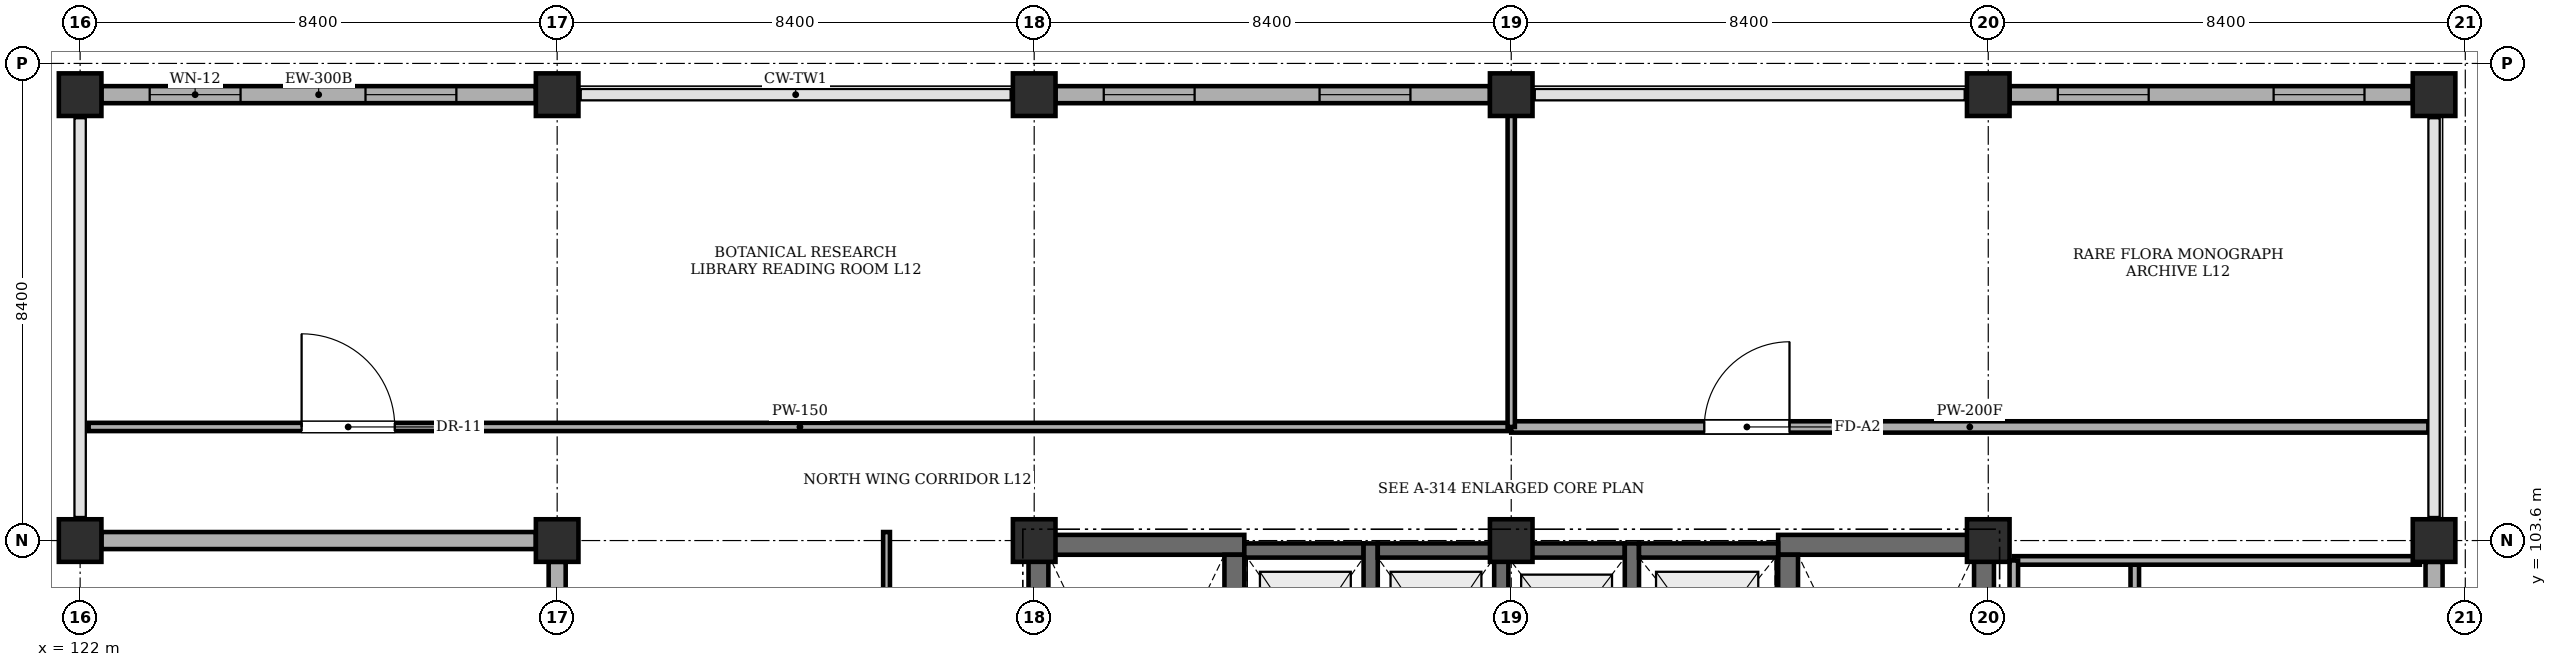
"""IFC4 building model, lengths in metres.
Left out: names, types, materials, properties, quantities, classifications, styles, units other than length and angle.
Written with IfcOpenShell. Run it as: python <this file> out.ifc"""

import sys

from ifc_helpers import new_model, si_unit, direction, frame, frame_2d, origin, origin_2d, place, context, subcontext, project, spatial, rectangle, extrude, element, fill, save


model = new_model("IFC4")
c1 = context("Model", 3, precision=1e-05, world=origin(), true_north=direction((0.0, 1.0)))
c2 = subcontext(c1, "Body", "Model", "MODEL_VIEW")
j1 = project(units=[si_unit("LENGTHUNIT", "METRE"), si_unit("PLANEANGLEUNIT", "RADIAN")], contexts=[c1])
p1 = place(None, origin())
s1 = spatial("IfcSite", under=j1, at=p1, CompositionType="ELEMENT")
p2 = place(p1, origin())
s2 = spatial("IfcBuilding", under=s1, at=p2, CompositionType="ELEMENT")
p3 = place(p2, frame((0.0, 0.0, 48.6)))
s3 = spatial("IfcBuildingStorey", under=s2, at=p3, CompositionType="ELEMENT", Elevation=48.6)
for number, where, z_axis, x_axis in (
    (1, (122.0, 103.6, 0.0), (0.0, 0.0, 1.0), (1.0, 0.0, 0.0)),
    (2, (122.0, 111.45, 0.0), (0.0, 0.0, 1.0), (1.0, 0.0, 0.0)),
    (3, (130.4, 103.6, 0.0), (0.0, 0.0, 1.0), (1.0, 0.0, 0.0)),
    (4, (130.4, 111.45, 0.0), (0.0, 0.0, 1.0), (1.0, 0.0, 0.0)),
    (5, (138.8, 103.6, 0.0), (0.0, 0.0, 1.0), (1.0, 0.0, 0.0)),
    (6, (138.8, 111.45, 0.0), (0.0, 0.0, 1.0), (1.0, 0.0, 0.0)),
    (7, (147.2, 103.6, 0.0), (0.0, 0.0, 1.0), (1.0, 0.0, 0.0)),
    (8, (147.2, 111.45, 0.0), (0.0, 0.0, 1.0), (1.0, 0.0, 0.0)),
    (9, (155.6, 103.6, 0.0), (0.0, 0.0, 1.0), (1.0, 0.0, 0.0)),
    (10, (155.6, 111.45, 0.0), (0.0, 0.0, 1.0), (1.0, 0.0, 0.0)),
    (11, (163.45, 103.6, 0.0), (0.0, 0.0, 1.0), (1.0, 0.0, 0.0)),
    (12, (163.45, 111.45, 0.0), (0.0, 0.0, 1.0), (1.0, 0.0, 0.0)),
):
    element("IfcColumn", number, at=place(p3, frame(where, z_axis=z_axis, x_axis=x_axis)), inside=s3, PredefinedType="COLUMN", context=c2, shape_type="SweptSolid", body=[
        extrude(rectangle(XDim=0.75, YDim=0.75, at=origin_2d()), origin(), (0.0, 0.0, 1.0), 4.03),
    ])
p4 = place(p3, frame((138.7, 103.525, 0.0), z_axis=(0.0, 0.0, 1.0), x_axis=(1.0, 0.0, 0.0)))
e13 = element("IfcWall", 13, at=p4, inside=s3, PredefinedType="SHEAR", context=c2, shape_type="SweptSolid", body=[
    extrude(rectangle(XDim=3.8, YDim=0.35, at=frame_2d((1.9, 0.0))), origin(), (0.0, 0.0, 1.0), 4.03),
])
p5 = place(p3, frame((138.875, 95.45, 0.0), z_axis=(0.0, 0.0, 1.0), x_axis=(0.0, 1.0, 0.0)))
e14 = element("IfcWall", 14, at=p5, inside=s3, PredefinedType="SHEAR", context=c2, shape_type="SweptSolid", body=[
    extrude(rectangle(XDim=7.9, YDim=0.35, at=frame_2d((3.95, 0.0))), origin(), (0.0, 0.0, 1.0), 4.03),
])
p6 = place(p3, frame((142.325, 95.45, 0.0), z_axis=(0.0, 0.0, 1.0), x_axis=(0.0, 1.0, 0.0)))
e15 = element("IfcWall", 15, at=p6, inside=s3, PredefinedType="SHEAR", context=c2, shape_type="SweptSolid", body=[
    extrude(rectangle(XDim=7.9, YDim=0.35, at=frame_2d((3.95, 0.0))), origin(), (0.0, 0.0, 1.0), 4.03),
])
p7 = place(p6, frame((0.22, 0.0, 0.0)))
e16 = element("IfcOpeningElement", 16, at=p7, cuts=e15, PredefinedType="OPENING", context=c2, shape_type="SweptSolid", body=[
    extrude(rectangle(XDim=1.15, YDim=2.15, at=frame_2d((0.575, 1.075))), frame((0.0, 0.185, 0.0), z_axis=(0.0, -1.0, 0.0), x_axis=(1.0, 0.0, 0.0)), (0.0, 0.0, 1.0), 0.37),
])
p8 = place(p3, frame((151.9, 103.525, 0.0), z_axis=(0.0, 0.0, 1.0), x_axis=(1.0, 0.0, 0.0)))
e17 = element("IfcWall", 17, at=p8, inside=s3, PredefinedType="SHEAR", context=c2, shape_type="SweptSolid", body=[
    extrude(rectangle(XDim=3.8, YDim=0.35, at=frame_2d((1.9, 0.0))), origin(), (0.0, 0.0, 1.0), 4.03),
])
p9 = place(p3, frame((152.075, 95.45, 0.0), z_axis=(0.0, 0.0, 1.0), x_axis=(0.0, 1.0, 0.0)))
e18 = element("IfcWall", 18, at=p9, inside=s3, PredefinedType="SHEAR", context=c2, shape_type="SweptSolid", body=[
    extrude(rectangle(XDim=7.9, YDim=0.35, at=frame_2d((3.95, 0.0))), origin(), (0.0, 0.0, 1.0), 4.03),
])
p10 = place(p9, frame((0.35, 0.0, 0.0)))
e19 = element("IfcOpeningElement", 19, at=p10, cuts=e18, PredefinedType="OPENING", context=c2, shape_type="SweptSolid", body=[
    extrude(rectangle(XDim=1.15, YDim=2.15, at=frame_2d((0.575, 1.075))), frame((0.0, 0.185, 0.0), z_axis=(0.0, -1.0, 0.0), x_axis=(1.0, 0.0, 0.0)), (0.0, 0.0, 1.0), 0.37),
])
p11 = place(p3, frame((155.525, 95.45, 0.0), z_axis=(0.0, 0.0, 1.0), x_axis=(0.0, 1.0, 0.0)))
e20 = element("IfcWall", 20, at=p11, inside=s3, PredefinedType="SHEAR", context=c2, shape_type="SweptSolid", body=[
    extrude(rectangle(XDim=7.9, YDim=0.35, at=frame_2d((3.95, 0.0))), origin(), (0.0, 0.0, 1.0), 4.03),
])
p12 = place(p3, frame((142.5, 103.425, 0.0), z_axis=(0.0, 0.0, 1.0), x_axis=(1.0, 0.0, 0.0)))
e21 = element("IfcWall", 21, at=p12, inside=s3, PredefinedType="SHEAR", context=c2, shape_type="SweptSolid", body=[
    extrude(rectangle(XDim=2.1, YDim=0.25, at=frame_2d((1.05, 0.0))), origin(), (0.0, 0.0, 1.0), 4.03),
])
p13 = place(p3, frame((144.725, 100.15, 0.0), z_axis=(0.0, 0.0, 1.0), x_axis=(0.0, 1.0, 0.0)))
e22 = element("IfcWall", 22, at=p13, inside=s3, PredefinedType="SHEAR", context=c2, shape_type="SweptSolid", body=[
    extrude(rectangle(XDim=3.4, YDim=0.25, at=frame_2d((1.7, 0.0))), origin(), (0.0, 0.0, 1.0), 4.03),
])
p14 = place(p3, frame((144.85, 103.425, 0.0), z_axis=(0.0, 0.0, 1.0), x_axis=(1.0, 0.0, 0.0)))
e23 = element("IfcWall", 23, at=p14, inside=s3, PredefinedType="SHEAR", context=c2, shape_type="SweptSolid", body=[
    extrude(rectangle(XDim=2.05, YDim=0.25, at=frame_2d((1.025, 0.0))), origin(), (0.0, 0.0, 1.0), 4.03),
])
p15 = place(p3, frame((147.025, 100.15, 0.0), z_axis=(0.0, 0.0, 1.0), x_axis=(0.0, 1.0, 0.0)))
e24 = element("IfcWall", 24, at=p15, inside=s3, PredefinedType="SHEAR", context=c2, shape_type="SweptSolid", body=[
    extrude(rectangle(XDim=3.4, YDim=0.25, at=frame_2d((1.7, 0.0))), origin(), (0.0, 0.0, 1.0), 4.03),
])
p16 = place(p3, frame((147.15, 103.425, 0.0), z_axis=(0.0, 0.0, 1.0), x_axis=(1.0, 0.0, 0.0)))
e25 = element("IfcWall", 25, at=p16, inside=s3, PredefinedType="SHEAR", context=c2, shape_type="SweptSolid", body=[
    extrude(rectangle(XDim=2.05, YDim=0.25, at=frame_2d((1.025, 0.0))), origin(), (0.0, 0.0, 1.0), 4.03),
])
p17 = place(p3, frame((149.325, 100.35, 0.0), z_axis=(0.0, 0.0, 1.0), x_axis=(0.0, 1.0, 0.0)))
e26 = element("IfcWall", 26, at=p17, inside=s3, PredefinedType="SHEAR", context=c2, shape_type="SweptSolid", body=[
    extrude(rectangle(XDim=3.2, YDim=0.25, at=frame_2d((1.6, 0.0))), origin(), (0.0, 0.0, 1.0), 4.03),
])
p18 = place(p3, frame((149.45, 103.425, 0.0), z_axis=(0.0, 0.0, 1.0), x_axis=(1.0, 0.0, 0.0)))
e27 = element("IfcWall", 27, at=p18, inside=s3, PredefinedType="SHEAR", context=c2, shape_type="SweptSolid", body=[
    extrude(rectangle(XDim=2.45, YDim=0.25, at=frame_2d((1.225, 0.0))), origin(), (0.0, 0.0, 1.0), 4.03),
])
p19 = place(p3, frame((122.375, 111.45, 0.0), z_axis=(0.0, 0.0, 1.0), x_axis=(1.0, 0.0, 0.0)))
e28 = element("IfcWall", 28, at=p19, inside=s3, PredefinedType="STANDARD", context=c2, shape_type="SweptSolid", body=[
    extrude(rectangle(XDim=7.65, YDim=0.3, at=frame_2d((3.825, 0.0))), origin(), (0.0, 0.0, 1.0), 3.33),
])
p20 = place(p19, frame((0.85, 0.0, 0.9)))
e29 = element("IfcOpeningElement", 29, at=p20, cuts=e28, PredefinedType="OPENING", context=c2, shape_type="SweptSolid", body=[
    extrude(rectangle(XDim=1.6, YDim=2.0, at=frame_2d((0.8, 1.0))), frame((0.0, 0.16, 0.0), z_axis=(0.0, -1.0, 0.0), x_axis=(1.0, 0.0, 0.0)), (0.0, 0.0, 1.0), 0.32),
])
p21 = place(p19, frame((4.65, 0.0, 0.9)))
e30 = element("IfcOpeningElement", 30, at=p21, cuts=e28, PredefinedType="OPENING", context=c2, shape_type="SweptSolid", body=[
    extrude(rectangle(XDim=1.6, YDim=2.0, at=frame_2d((0.8, 1.0))), frame((0.0, 0.16, 0.0), z_axis=(0.0, -1.0, 0.0), x_axis=(1.0, 0.0, 0.0)), (0.0, 0.0, 1.0), 0.32),
])
p22 = place(p3, frame((139.175, 111.45, 0.0), z_axis=(0.0, 0.0, 1.0), x_axis=(1.0, 0.0, 0.0)))
e31 = element("IfcWall", 31, at=p22, inside=s3, PredefinedType="STANDARD", context=c2, shape_type="SweptSolid", body=[
    extrude(rectangle(XDim=7.65, YDim=0.3, at=frame_2d((3.825, 0.0))), origin(), (0.0, 0.0, 1.0), 3.33),
])
p23 = place(p22, frame((0.85, 0.0, 0.9)))
e32 = element("IfcOpeningElement", 32, at=p23, cuts=e31, PredefinedType="OPENING", context=c2, shape_type="SweptSolid", body=[
    extrude(rectangle(XDim=1.6, YDim=2.0, at=frame_2d((0.8, 1.0))), frame((0.0, 0.16, 0.0), z_axis=(0.0, -1.0, 0.0), x_axis=(1.0, 0.0, 0.0)), (0.0, 0.0, 1.0), 0.32),
])
p24 = place(p22, frame((4.65, 0.0, 0.9)))
e33 = element("IfcOpeningElement", 33, at=p24, cuts=e31, PredefinedType="OPENING", context=c2, shape_type="SweptSolid", body=[
    extrude(rectangle(XDim=1.6, YDim=2.0, at=frame_2d((0.8, 1.0))), frame((0.0, 0.16, 0.0), z_axis=(0.0, -1.0, 0.0), x_axis=(1.0, 0.0, 0.0)), (0.0, 0.0, 1.0), 0.32),
])
p25 = place(p3, frame((155.975, 111.45, 0.0), z_axis=(0.0, 0.0, 1.0), x_axis=(1.0, 0.0, 0.0)))
e34 = element("IfcWall", 34, at=p25, inside=s3, PredefinedType="STANDARD", context=c2, shape_type="SweptSolid", body=[
    extrude(rectangle(XDim=7.1, YDim=0.3, at=frame_2d((3.55, 0.0))), origin(), (0.0, 0.0, 1.0), 3.33),
])
p26 = place(p25, frame((0.85, 0.0, 0.9)))
e35 = element("IfcOpeningElement", 35, at=p26, cuts=e34, PredefinedType="OPENING", context=c2, shape_type="SweptSolid", body=[
    extrude(rectangle(XDim=1.6, YDim=2.0, at=frame_2d((0.8, 1.0))), frame((0.0, 0.16, 0.0), z_axis=(0.0, -1.0, 0.0), x_axis=(1.0, 0.0, 0.0)), (0.0, 0.0, 1.0), 0.32),
])
p27 = place(p25, frame((4.65, 0.0, 0.9)))
e36 = element("IfcOpeningElement", 36, at=p27, cuts=e34, PredefinedType="OPENING", context=c2, shape_type="SweptSolid", body=[
    extrude(rectangle(XDim=1.6, YDim=2.0, at=frame_2d((0.8, 1.0))), frame((0.0, 0.16, 0.0), z_axis=(0.0, -1.0, 0.0), x_axis=(1.0, 0.0, 0.0)), (0.0, 0.0, 1.0), 0.32),
])
p28 = place(p3, frame((163.45, 103.225, 0.0), z_axis=(0.0, 0.0, 1.0), x_axis=(0.0, -1.0, 0.0)))
e37 = element("IfcWall", 37, at=p28, inside=s3, PredefinedType="STANDARD", context=c2, shape_type="SweptSolid", body=[
    extrude(rectangle(XDim=7.65, YDim=0.3, at=frame_2d((3.825, 0.0))), origin(), (0.0, 0.0, 1.0), 3.33),
])
p29 = place(p28, frame((1.15, 0.0, 1.1)))
e38 = element("IfcOpeningElement", 38, at=p29, cuts=e37, PredefinedType="OPENING", context=c2, shape_type="SweptSolid", body=[
    extrude(rectangle(XDim=1.4, YDim=1.4, at=frame_2d((0.7, 0.7))), frame((0.0, 0.16, 0.0), z_axis=(0.0, -1.0, 0.0), x_axis=(1.0, 0.0, 0.0)), (0.0, 0.0, 1.0), 0.32),
])
p30 = place(p3, frame((130.4, 95.575, 0.0), z_axis=(0.0, 0.0, 1.0), x_axis=(0.0, 1.0, 0.0)))
e39 = element("IfcWall", 39, at=p30, inside=s3, PredefinedType="STANDARD", context=c2, shape_type="SweptSolid", body=[
    extrude(rectangle(XDim=7.65, YDim=0.3, at=frame_2d((3.825, 0.0))), origin(), (0.0, 0.0, 1.0), 3.33),
])
p31 = place(p30, frame((2.4, 0.0, 1.0)))
e40 = element("IfcOpeningElement", 40, at=p31, cuts=e39, PredefinedType="OPENING", context=c2, shape_type="SweptSolid", body=[
    extrude(rectangle(XDim=1.8, YDim=1.8, at=frame_2d((0.9, 0.9))), frame((0.0, 0.16, 0.0), z_axis=(0.0, -1.0, 0.0), x_axis=(1.0, 0.0, 0.0)), (0.0, 0.0, 1.0), 0.32),
])
p32 = place(p3, frame((130.025, 103.6, 0.0), z_axis=(0.0, 0.0, 1.0), x_axis=(-1.0, 0.0, 0.0)))
e41 = element("IfcWall", 41, at=p32, inside=s3, PredefinedType="STANDARD", context=c2, shape_type="SweptSolid", body=[
    extrude(rectangle(XDim=7.65, YDim=0.3, at=frame_2d((3.825, 0.0))), origin(), (0.0, 0.0, 1.0), 3.33),
])
p33 = place(p3, frame((158.18, 94.68, 0.0), z_axis=(0.0, 0.0, 1.0), x_axis=(0.0, 1.0, 0.0)))
e42 = element("IfcWall", 42, at=p33, inside=s3, PredefinedType="PARTITIONING", context=c2, shape_type="SweptSolid", body=[
    extrude(rectangle(XDim=8.57, YDim=0.15, at=frame_2d((4.285, 0.0))), origin(), (0.0, 0.0, 1.0), 4.03),
])
p34 = place(p33, frame((0.8, 0.0, 0.0)))
e43 = element("IfcOpeningElement", 43, at=p34, cuts=e42, PredefinedType="OPENING", context=c2, shape_type="SweptSolid", body=[
    extrude(rectangle(XDim=1.0, YDim=2.12, at=frame_2d((0.5, 1.06))), frame((0.0, 0.085, 0.0), z_axis=(0.0, -1.0, 0.0), x_axis=(1.0, 0.0, 0.0)), (0.0, 0.0, 1.0), 0.17),
])
p35 = place(p33, frame((3.5, 0.0, 0.0)))
e44 = element("IfcOpeningElement", 44, at=p35, cuts=e42, PredefinedType="OPENING", context=c2, shape_type="SweptSolid", body=[
    extrude(rectangle(XDim=0.92, YDim=2.1, at=frame_2d((0.46, 1.05))), frame((0.0, 0.085, 0.0), z_axis=(0.0, -1.0, 0.0), x_axis=(1.0, 0.0, 0.0)), (0.0, 0.0, 1.0), 0.17),
])
p36 = place(p33, frame((6.4, 0.0, 0.0)))
e45 = element("IfcOpeningElement", 45, at=p36, cuts=e42, PredefinedType="OPENING", context=c2, shape_type="SweptSolid", body=[
    extrude(rectangle(XDim=0.92, YDim=2.1, at=frame_2d((0.46, 1.05))), frame((0.0, 0.085, 0.0), z_axis=(0.0, -1.0, 0.0), x_axis=(1.0, 0.0, 0.0)), (0.0, 0.0, 1.0), 0.17),
])
p37 = place(p3, frame((156.05, 103.25, 0.0), z_axis=(0.0, 0.0, 1.0), x_axis=(1.0, 0.0, 0.0)))
e46 = element("IfcWall", 46, at=p37, inside=s3, PredefinedType="PARTITIONING", context=c2, shape_type="SweptSolid", body=[
    extrude(rectangle(XDim=7.15, YDim=0.15, at=frame_2d((3.575, 0.0))), origin(), (0.0, 0.0, 1.0), 4.03),
])
p38 = place(p3, frame((156.05, 94.68, 0.0), z_axis=(0.0, 0.0, 1.0), x_axis=(0.0, 1.0, 0.0)))
e47 = element("IfcWall", 47, at=p38, inside=s3, PredefinedType="PARTITIONING", context=c2, shape_type="SweptSolid", body=[
    extrude(rectangle(XDim=8.57, YDim=0.15, at=frame_2d((4.285, 0.0))), origin(), (0.0, 0.0, 1.0), 4.03),
])
p39 = place(p3, frame((136.2, 94.68, 0.0), z_axis=(0.0, 0.0, 1.0), x_axis=(0.0, 1.0, 0.0)))
e48 = element("IfcWall", 48, at=p39, inside=s3, PredefinedType="PARTITIONING", context=c2, shape_type="SweptSolid", body=[
    extrude(rectangle(XDim=9.07, YDim=0.12, at=frame_2d((4.535, 0.0))), origin(), (0.0, 0.0, 1.0), 4.03),
])
p40 = place(p3, frame((122.15, 105.6, 0.0), z_axis=(0.0, 0.0, 1.0), x_axis=(1.0, 0.0, 0.0)))
e49 = element("IfcWall", 49, at=p40, inside=s3, PredefinedType="PARTITIONING", context=c2, shape_type="SweptSolid", body=[
    extrude(rectangle(XDim=25.05, YDim=0.145, at=frame_2d((12.525, 0.0))), origin(), (0.0, 0.0, 1.0), 4.03),
])
p41 = place(p40, frame((3.75, 0.0, 0.0)))
e50 = element("IfcOpeningElement", 50, at=p41, cuts=e49, PredefinedType="OPENING", context=c2, shape_type="SweptSolid", body=[
    extrude(rectangle(XDim=1.64, YDim=2.24, at=frame_2d((0.82, 1.12))), frame((0.0, 0.083, 0.0), z_axis=(0.0, -1.0, 0.0), x_axis=(1.0, 0.0, 0.0)), (0.0, 0.0, 1.0), 0.165),
])
p42 = place(p3, frame((147.2, 105.6, 0.0), z_axis=(0.0, 0.0, 1.0), x_axis=(1.0, 0.0, 0.0)))
e51 = element("IfcWall", 51, at=p42, inside=s3, PredefinedType="SOLIDWALL", context=c2, shape_type="SweptSolid", body=[
    extrude(rectangle(XDim=16.15, YDim=0.2, at=frame_2d((8.075, 0.0))), origin(), (0.0, 0.0, 1.0), 4.03),
])
p43 = place(p42, frame((3.4, 0.0, 0.0)))
e52 = element("IfcOpeningElement", 52, at=p43, cuts=e51, PredefinedType="OPENING", context=c2, shape_type="SweptSolid", body=[
    extrude(rectangle(XDim=1.5, YDim=2.2, at=frame_2d((0.75, 1.1))), frame((0.0, 0.11, 0.0), z_axis=(0.0, -1.0, 0.0), x_axis=(1.0, 0.0, 0.0)), (0.0, 0.0, 1.0), 0.22),
])
p44 = place(p3, frame((147.2, 105.6, 0.0), z_axis=(0.0, 0.0, 1.0), x_axis=(0.0, 1.0, 0.0)))
e53 = element("IfcWall", 53, at=p44, inside=s3, PredefinedType="PARTITIONING", context=c2, shape_type="SweptSolid", body=[
    extrude(rectangle(XDim=5.75, YDim=0.128, at=frame_2d((2.875, 0.0))), origin(), (0.0, 0.0, 1.0), 3.33),
])
p45 = place(p20, origin())
e54 = element("IfcWindow", 54, at=p45, inside=s3, PartitioningType="DOUBLE_PANEL_VERTICAL", PredefinedType="WINDOW", context=c2, shape_type="SweptSolid", body=[
    extrude(rectangle(XDim=1.6, YDim=2.0, at=frame_2d((0.8, 1.0))), frame((0.0, 0.03, 0.0), z_axis=(0.0, -1.0, 0.0), x_axis=(1.0, 0.0, 0.0)), (0.0, 0.0, 1.0), 0.06),
])
fill(e29, e54)
p46 = place(p21, origin())
e55 = element("IfcWindow", 55, at=p46, inside=s3, PartitioningType="DOUBLE_PANEL_VERTICAL", PredefinedType="WINDOW", context=c2, shape_type="SweptSolid", body=[
    extrude(rectangle(XDim=1.6, YDim=2.0, at=frame_2d((0.8, 1.0))), frame((0.0, 0.03, 0.0), z_axis=(0.0, -1.0, 0.0), x_axis=(1.0, 0.0, 0.0)), (0.0, 0.0, 1.0), 0.06),
])
fill(e30, e55)
p47 = place(p23, origin())
e56 = element("IfcWindow", 56, at=p47, inside=s3, PartitioningType="DOUBLE_PANEL_VERTICAL", PredefinedType="WINDOW", context=c2, shape_type="SweptSolid", body=[
    extrude(rectangle(XDim=1.6, YDim=2.0, at=frame_2d((0.8, 1.0))), frame((0.0, 0.03, 0.0), z_axis=(0.0, -1.0, 0.0), x_axis=(1.0, 0.0, 0.0)), (0.0, 0.0, 1.0), 0.06),
])
fill(e32, e56)
p48 = place(p24, origin())
e57 = element("IfcWindow", 57, at=p48, inside=s3, PartitioningType="DOUBLE_PANEL_VERTICAL", PredefinedType="WINDOW", context=c2, shape_type="SweptSolid", body=[
    extrude(rectangle(XDim=1.6, YDim=2.0, at=frame_2d((0.8, 1.0))), frame((0.0, 0.03, 0.0), z_axis=(0.0, -1.0, 0.0), x_axis=(1.0, 0.0, 0.0)), (0.0, 0.0, 1.0), 0.06),
])
fill(e33, e57)
p49 = place(p26, origin())
e58 = element("IfcWindow", 58, at=p49, inside=s3, PartitioningType="DOUBLE_PANEL_VERTICAL", PredefinedType="WINDOW", context=c2, shape_type="SweptSolid", body=[
    extrude(rectangle(XDim=1.6, YDim=2.0, at=frame_2d((0.8, 1.0))), frame((0.0, 0.03, 0.0), z_axis=(0.0, -1.0, 0.0), x_axis=(1.0, 0.0, 0.0)), (0.0, 0.0, 1.0), 0.06),
])
fill(e35, e58)
p50 = place(p27, origin())
e59 = element("IfcWindow", 59, at=p50, inside=s3, PartitioningType="DOUBLE_PANEL_VERTICAL", PredefinedType="WINDOW", context=c2, shape_type="SweptSolid", body=[
    extrude(rectangle(XDim=1.6, YDim=2.0, at=frame_2d((0.8, 1.0))), frame((0.0, 0.03, 0.0), z_axis=(0.0, -1.0, 0.0), x_axis=(1.0, 0.0, 0.0)), (0.0, 0.0, 1.0), 0.06),
])
fill(e36, e59)
p51 = place(p41, origin())
e60 = element("IfcDoor", 60, at=p51, inside=s3, OperationType="SINGLE_SWING_LEFT", PredefinedType="DOOR", context=c2, shape_type="SweptSolid", body=[
    extrude(rectangle(XDim=1.64, YDim=2.24, at=frame_2d((0.82, 1.12))), frame((0.0, 0.025, 0.0), z_axis=(0.0, -1.0, 0.0), x_axis=(1.0, 0.0, 0.0)), (0.0, 0.0, 1.0), 0.05),
])
fill(e50, e60)
p52 = place(p43, origin())
e61 = element("IfcDoor", 61, at=p52, inside=s3, OperationType="SINGLE_SWING_RIGHT", PredefinedType="DOOR", context=c2, shape_type="SweptSolid", body=[
    extrude(rectangle(XDim=1.5, YDim=2.2, at=frame_2d((0.75, 1.1))), frame((0.0, 0.025, 0.0), z_axis=(0.0, -1.0, 0.0), x_axis=(1.0, 0.0, 0.0)), (0.0, 0.0, 1.0), 0.05),
])
fill(e52, e61)
save(model, sys.argv[1])
